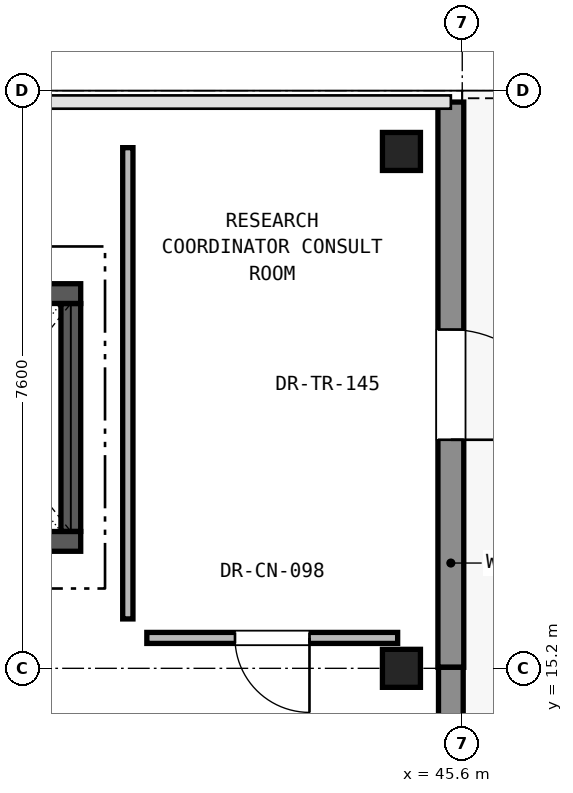
"""IFC4 building model, lengths in metres.
Left out: names, types, materials, properties, quantities, classifications, styles, units other than length and angle.
Written with IfcOpenShell. Run it as: python <this file> out.ifc"""

import sys

from ifc_helpers import new_model, si_unit, direction, frame, frame_2d, origin, origin_2d, place, context, subcontext, project, spatial, rectangle, extrude, element, fill, save


model = new_model("IFC4")
c1 = context("Model", 3, precision=1e-05, world=origin(), true_north=direction((0.0, 1.0)))
c2 = subcontext(c1, "Body", "Model", "MODEL_VIEW")
j1 = project(units=[si_unit("LENGTHUNIT", "METRE"), si_unit("PLANEANGLEUNIT", "RADIAN")], contexts=[c1])
p1 = place(None, origin())
s1 = spatial("IfcSite", under=j1, at=p1, CompositionType="ELEMENT")
p2 = place(p1, origin())
s2 = spatial("IfcBuilding", under=s1, at=p2, CompositionType="ELEMENT")
p3 = place(p2, frame((0.0, 0.0, 17.68)))
s3 = spatial("IfcBuildingStorey", under=s2, at=p3, CompositionType="ELEMENT", Elevation=17.68)
for number, where, z_axis, x_axis in (
    (1, (44.8, 15.2, 0.0), (0.0, 0.0, 1.0), (1.0, 0.0, 0.0)),
    (2, (44.8, 22.0, 0.0), (0.0, 0.0, 1.0), (1.0, 0.0, 0.0)),
):
    element("IfcColumn", number, at=place(p3, frame(where, z_axis=z_axis, x_axis=x_axis)), inside=s3, PredefinedType="COLUMN", context=c2, shape_type="SweptSolid", body=[
        extrude(rectangle(XDim=0.5, YDim=0.5, at=origin_2d()), origin(), (0.0, 0.0, 1.0), 4.08),
    ])
p4 = place(p3, frame((45.45, 22.65, 0.0), z_axis=(0.0, 0.0, 1.0), x_axis=(0.0, -1.0, 0.0)))
e3 = element("IfcWall", 3, at=p4, inside=s3, PredefinedType="SOLIDWALL", context=c2, shape_type="SweptSolid", body=[
    extrude(rectangle(XDim=7.437, YDim=0.34, at=frame_2d((3.718, 0.0))), origin(), (0.0, 0.0, 1.0), 3.72),
])
p5 = place(p4, frame((2.993, 0.0, 0.0)))
e4 = element("IfcOpeningElement", 4, at=p5, cuts=e3, PredefinedType="OPENING", context=c2, shape_type="SweptSolid", body=[
    extrude(rectangle(XDim=1.45, YDim=2.2, at=frame_2d((0.725, 1.1))), frame((0.0, 0.18, 0.0), z_axis=(0.0, -1.0, 0.0), x_axis=(1.0, 0.0, 0.0)), (0.0, 0.0, 1.0), 0.36),
])
p6 = place(p3, frame((45.45, 15.213, 0.0), z_axis=(0.0, 0.0, 1.0), x_axis=(0.0, -1.0, 0.0)))
e5 = element("IfcWall", 5, at=p6, inside=s3, PredefinedType="SOLIDWALL", context=c2, shape_type="SweptSolid", body=[
    extrude(rectangle(XDim=7.437, YDim=0.325, at=frame_2d((3.718, 0.0))), origin(), (0.0, 0.0, 1.0), 3.72),
])
p7 = place(p6, frame((3.043, 0.0, 0.0)))
e6 = element("IfcOpeningElement", 6, at=p7, cuts=e5, PredefinedType="OPENING", context=c2, shape_type="SweptSolid", body=[
    extrude(rectangle(XDim=1.35, YDim=2.2, at=frame_2d((0.675, 1.1))), frame((0.0, 0.172, 0.0), z_axis=(0.0, -1.0, 0.0), x_axis=(1.0, 0.0, 0.0)), (0.0, 0.0, 1.0), 0.345),
])
p8 = place(p3, frame((37.922, 16.87, 0.0), z_axis=(0.0, 0.0, 1.0), x_axis=(1.0, 0.0, 0.0)))
e7 = element("IfcWall", 7, at=p8, inside=s3, PredefinedType="SHEAR", context=c2, shape_type="SweptSolid", body=[
    extrude(rectangle(XDim=2.658, YDim=0.26, at=frame_2d((1.329, 0.0))), origin(), (0.0, 0.0, 1.0), 3.72),
])
p9 = place(p3, frame((37.922, 20.13, 0.0), z_axis=(0.0, 0.0, 1.0), x_axis=(1.0, 0.0, 0.0)))
e8 = element("IfcWall", 8, at=p9, inside=s3, PredefinedType="SHEAR", context=c2, shape_type="SweptSolid", body=[
    extrude(rectangle(XDim=2.658, YDim=0.26, at=frame_2d((1.329, 0.0))), origin(), (0.0, 0.0, 1.0), 3.72),
])
p10 = place(p9, frame((0.679, 0.0, 0.0)))
e9 = element("IfcOpeningElement", 9, at=p10, cuts=e8, PredefinedType="OPENING", context=c2, shape_type="SweptSolid", body=[
    extrude(rectangle(XDim=1.3, YDim=2.2, at=frame_2d((0.65, 1.1))), frame((0.0, 0.14, 0.0), z_axis=(0.0, -1.0, 0.0), x_axis=(1.0, 0.0, 0.0)), (0.0, 0.0, 1.0), 0.28),
])
p11 = place(p3, frame((40.45, 17.002, 0.0), z_axis=(0.0, 0.0, 1.0), x_axis=(0.0, 1.0, 0.0)))
e10 = element("IfcWall", 10, at=p11, inside=s3, PredefinedType="SHEAR", context=c2, shape_type="SweptSolid", body=[
    extrude(rectangle(XDim=2.996, YDim=0.26, at=frame_2d((1.498, 0.0))), origin(), (0.0, 0.0, 1.0), 3.72),
])
p12 = place(p3, frame((44.75, 15.6, 0.0), z_axis=(0.0, 0.0, 1.0), x_axis=(-1.0, 0.0, 0.0)))
e11 = element("IfcWall", 11, at=p12, inside=s3, PredefinedType="PARTITIONING", context=c2, shape_type="SweptSolid", body=[
    extrude(rectangle(XDim=3.3, YDim=0.145, at=frame_2d((1.65, 0.0))), origin(), (0.0, 0.0, 1.0), 3.12),
])
p13 = place(p12, frame((1.16, 0.0, 0.0)))
e12 = element("IfcOpeningElement", 12, at=p13, cuts=e11, PredefinedType="OPENING", context=c2, shape_type="SweptSolid", body=[
    extrude(rectangle(XDim=0.98, YDim=2.15, at=frame_2d((0.49, 1.075))), frame((0.0, 0.083, 0.0), z_axis=(0.0, -1.0, 0.0), x_axis=(1.0, 0.0, 0.0)), (0.0, 0.0, 1.0), 0.165),
])
p14 = place(p3, frame((41.2, 15.85, 0.0), z_axis=(0.0, 0.0, 1.0), x_axis=(0.0, 1.0, 0.0)))
e13 = element("IfcWall", 13, at=p14, inside=s3, PredefinedType="PARTITIONING", context=c2, shape_type="SweptSolid", body=[
    extrude(rectangle(XDim=6.2, YDim=0.135, at=frame_2d((3.1, 0.0))), origin(), (0.0, 0.0, 1.0), 3.12),
])
p15 = place(p5, origin())
e14 = element("IfcDoor", 14, at=p15, inside=s3, OperationType="SINGLE_SWING_RIGHT", PredefinedType="DOOR", context=c2, shape_type="SweptSolid", body=[
    extrude(rectangle(XDim=1.45, YDim=2.2, at=frame_2d((0.725, 1.1))), frame((0.0, 0.025, 0.0), z_axis=(0.0, -1.0, 0.0), x_axis=(1.0, 0.0, 0.0)), (0.0, 0.0, 1.0), 0.05),
])
fill(e4, e14)
p16 = place(p13, origin())
e15 = element("IfcDoor", 15, at=p16, inside=s3, OperationType="SINGLE_SWING_LEFT", PredefinedType="DOOR", context=c2, shape_type="SweptSolid", body=[
    extrude(rectangle(XDim=0.98, YDim=2.15, at=frame_2d((0.49, 1.075))), frame((0.0, 0.025, 0.0), z_axis=(0.0, -1.0, 0.0), x_axis=(1.0, 0.0, 0.0)), (0.0, 0.0, 1.0), 0.05),
])
fill(e12, e15)
save(model, sys.argv[1])
